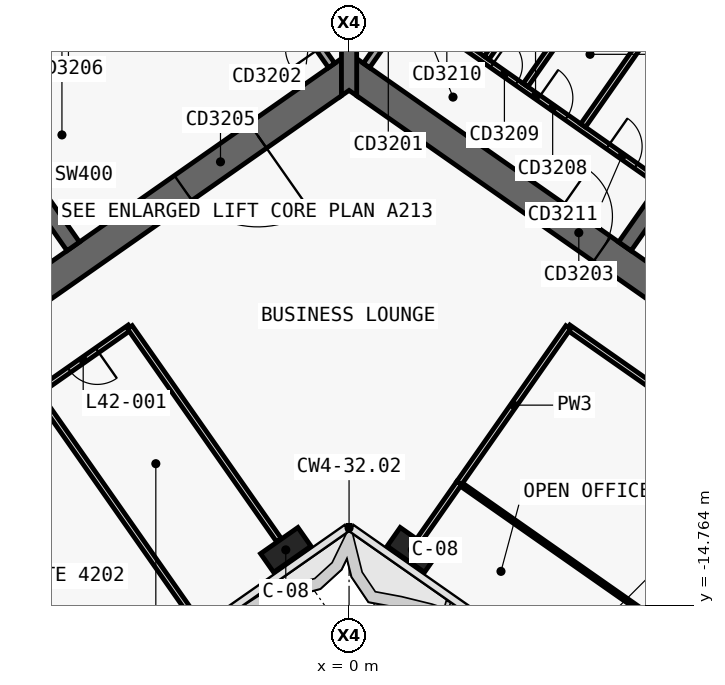
"""IFC4 building model, lengths in metres.
Left out: names, types, materials, properties, quantities, classifications, styles, units other than length and angle.
Written with IfcOpenShell. Run it as: python <this file> out.ifc"""

import sys

from ifc_helpers import new_model, si_unit, direction, frame, frame_2d, origin, origin_2d, place, context, subcontext, project, spatial, polyline, rectangle, outline, extrude, element, fill, save


model = new_model("IFC4")
c1 = context("Model", 3, precision=1e-05, world=origin(), true_north=direction((0.0, 1.0)))
c2 = subcontext(c1, "Body", "Model", "MODEL_VIEW")
j1 = project(units=[si_unit("LENGTHUNIT", "METRE"), si_unit("PLANEANGLEUNIT", "RADIAN")], contexts=[c1])
p1 = place(None, origin())
s1 = spatial("IfcSite", under=j1, at=p1, CompositionType="ELEMENT")
p2 = place(p1, origin())
s2 = spatial("IfcBuilding", under=s1, at=p2, CompositionType="ELEMENT")
p3 = place(p2, frame((0.0, 0.0, 182.7)))
s3 = spatial("IfcBuildingStorey", under=s2, at=p3, CompositionType="ELEMENT", Elevation=182.7)
p4 = place(p3, frame((0.029, 11.984, 0.0), z_axis=(0.0, 0.0, 1.0), x_axis=(-0.819151382952, -0.573577380837, 0.0)))
e1 = element("IfcWall", 1, at=p4, inside=s3, PredefinedType="SHEAR", context=c2, shape_type="SweptSolid", body=[
    extrude(outline(polyline([(33.898, 0.4), (0.56, 0.4), (-0.0, -0.4), (33.898, -0.4), (33.898, 0.4)])), origin(), (0.0, 0.0, 1.0), 3.9),
])
p5 = place(p3, frame((0.029, -0.712, 0.0), z_axis=(0.0, 0.0, 1.0), x_axis=(-0.819151758019, -0.573576845187, 0.0)))
e2 = element("IfcWall", 2, at=p5, inside=s3, PredefinedType="SHEAR", context=c2, shape_type="SweptSolid", body=[
    extrude(outline(polyline([(26.616, 0.4), (0.56, 0.4), (-0.0, -0.4), (26.616, -0.4), (26.616, 0.4)])), origin(), (0.0, 0.0, 1.0), 3.9),
])
p6 = place(p5, frame((2.966, 0.0, 0.0)))
e3 = element("IfcOpeningElement", 3, at=p6, cuts=e2, PredefinedType="OPENING", context=c2, shape_type="SweptSolid", body=[
    extrude(rectangle(XDim=2.4, YDim=2.1, at=frame_2d((1.2, 1.05))), frame((0.0, 0.41, 0.0), z_axis=(0.0, -1.0, 0.0), x_axis=(1.0, 0.0, 0.0)), (0.0, 0.0, 1.0), 0.82),
])
p7 = place(p5, frame((11.916, 0.0, 0.0)))
e4 = element("IfcOpeningElement", 4, at=p7, cuts=e2, PredefinedType="OPENING", context=c2, shape_type="SweptSolid", body=[
    extrude(rectangle(XDim=2.4, YDim=2.1, at=frame_2d((1.2, 1.05))), frame((0.0, 0.41, 0.0), z_axis=(0.0, -1.0, 0.0), x_axis=(1.0, 0.0, 0.0)), (0.0, 0.0, 1.0), 0.82),
])
p8 = place(p3, frame((-7.258, -5.326, 0.0), z_axis=(0.0, 0.0, 1.0), x_axis=(-0.573540709186, 0.819177059558, 0.0)))
e5 = element("IfcWall", 5, at=p8, inside=s3, PredefinedType="SHEAR", context=c2, shape_type="SweptSolid", body=[
    extrude(outline(polyline([(4.6, 0.2), (-0.0, 0.2), (-0.0, -0.2), (4.6, -0.2), (4.6, 0.2)])), origin(), (0.0, 0.0, 1.0), 3.9),
])
p9 = place(p3, frame((-2.638, 3.768, 0.0), z_axis=(0.0, 0.0, 1.0), x_axis=(-0.81915267502, -0.573575535572, 0.0)))
e6 = element("IfcWall", 6, at=p9, inside=s3, PredefinedType="SHEAR", context=c2, shape_type="SweptSolid", body=[
    extrude(outline(polyline([(26.2, 0.2), (0.0, 0.2), (0.0, -0.2), (26.2, -0.2), (26.2, 0.2)])), origin(), (0.0, 0.0, 1.0), 3.9),
])
p10 = place(p9, frame((1.169, 0.0, 0.0)))
e7 = element("IfcOpeningElement", 7, at=p10, cuts=e6, PredefinedType="OPENING", context=c2, shape_type="SweptSolid", body=[
    extrude(rectangle(XDim=1.1, YDim=2.1, at=frame_2d((0.55, 1.05))), frame((0.0, 0.21, 0.0), z_axis=(0.0, -1.0, 0.0), x_axis=(1.0, 0.0, 0.0)), (0.0, 0.0, 1.0), 0.42),
])
p11 = place(p9, frame((3.206, 0.0, 0.0)))
e8 = element("IfcOpeningElement", 8, at=p11, cuts=e6, PredefinedType="OPENING", context=c2, shape_type="SweptSolid", body=[
    extrude(rectangle(XDim=1.1, YDim=2.1, at=frame_2d((0.55, 1.05))), frame((0.0, 0.21, 0.0), z_axis=(0.0, -1.0, 0.0), x_axis=(1.0, 0.0, 0.0)), (0.0, 0.0, 1.0), 0.42),
])
p12 = place(p9, frame((5.244, 0.0, 0.0)))
e9 = element("IfcOpeningElement", 9, at=p12, cuts=e6, PredefinedType="OPENING", context=c2, shape_type="SweptSolid", body=[
    extrude(rectangle(XDim=1.1, YDim=2.1, at=frame_2d((0.55, 1.05))), frame((0.0, 0.21, 0.0), z_axis=(0.0, -1.0, 0.0), x_axis=(1.0, 0.0, 0.0)), (0.0, 0.0, 1.0), 0.42),
])
p13 = place(p9, frame((7.281, 0.0, 0.0)))
e10 = element("IfcOpeningElement", 10, at=p13, cuts=e6, PredefinedType="OPENING", context=c2, shape_type="SweptSolid", body=[
    extrude(rectangle(XDim=1.1, YDim=2.1, at=frame_2d((0.55, 1.05))), frame((0.0, 0.21, 0.0), z_axis=(0.0, -1.0, 0.0), x_axis=(1.0, 0.0, 0.0)), (0.0, 0.0, 1.0), 0.42),
])
p14 = place(p9, frame((9.688, 0.0, 0.0)))
e11 = element("IfcOpeningElement", 11, at=p14, cuts=e6, PredefinedType="OPENING", context=c2, shape_type="SweptSolid", body=[
    extrude(rectangle(XDim=1.1, YDim=2.1, at=frame_2d((0.55, 1.05))), frame((0.0, 0.21, 0.0), z_axis=(0.0, -1.0, 0.0), x_axis=(1.0, 0.0, 0.0)), (0.0, 0.0, 1.0), 0.42),
])
p15 = place(p9, frame((11.863, 0.0, 0.0)))
e12 = element("IfcOpeningElement", 12, at=p15, cuts=e6, PredefinedType="OPENING", context=c2, shape_type="SweptSolid", body=[
    extrude(rectangle(XDim=1.1, YDim=2.1, at=frame_2d((0.55, 1.05))), frame((0.0, 0.21, 0.0), z_axis=(0.0, -1.0, 0.0), x_axis=(1.0, 0.0, 0.0)), (0.0, 0.0, 1.0), 0.42),
])
p16 = place(p3, frame((-0.029, 11.984, 0.0), z_axis=(0.0, 0.0, 1.0), x_axis=(0.819151382952, -0.573577380837, 0.0)))
e13 = element("IfcWall", 13, at=p16, inside=s3, PredefinedType="SHEAR", context=c2, shape_type="SweptSolid", body=[
    extrude(outline(polyline([(33.898, 0.4), (-0.0, 0.4), (0.56, -0.4), (33.898, -0.4), (33.898, 0.4)])), origin(), (0.0, 0.0, 1.0), 3.9),
])
p17 = place(p3, frame((-0.029, -0.712, 0.0), z_axis=(0.0, 0.0, 1.0), x_axis=(0.819151758019, -0.573576845187, 0.0)))
e14 = element("IfcWall", 14, at=p17, inside=s3, PredefinedType="SHEAR", context=c2, shape_type="SweptSolid", body=[
    extrude(outline(polyline([(26.616, 0.4), (-0.0, 0.4), (0.56, -0.4), (26.616, -0.4), (26.616, 0.4)])), origin(), (0.0, 0.0, 1.0), 3.9),
])
p18 = place(p17, frame((6.666, 0.0, 0.0)))
e15 = element("IfcOpeningElement", 15, at=p18, cuts=e14, PredefinedType="OPENING", context=c2, shape_type="SweptSolid", body=[
    extrude(rectangle(XDim=1.5, YDim=2.1, at=frame_2d((0.75, 1.05))), frame((0.0, 0.41, 0.0), z_axis=(0.0, -1.0, 0.0), x_axis=(1.0, 0.0, 0.0)), (0.0, 0.0, 1.0), 0.82),
])
p19 = place(p17, frame((12.366, 0.0, 0.0)))
e16 = element("IfcOpeningElement", 16, at=p19, cuts=e14, PredefinedType="OPENING", context=c2, shape_type="SweptSolid", body=[
    extrude(rectangle(XDim=1.5, YDim=2.1, at=frame_2d((0.75, 1.05))), frame((0.0, 0.41, 0.0), z_axis=(0.0, -1.0, 0.0), x_axis=(1.0, 0.0, 0.0)), (0.0, 0.0, 1.0), 0.82),
])
p20 = place(p3, frame((7.258, -5.326, 0.0), z_axis=(0.0, 0.0, 1.0), x_axis=(0.573540709186, 0.819177059558, 0.0)))
e17 = element("IfcWall", 17, at=p20, inside=s3, PredefinedType="SHEAR", context=c2, shape_type="SweptSolid", body=[
    extrude(outline(polyline([(-0.0, 0.2), (-0.0, -0.2), (4.6, -0.2), (4.6, 0.2), (-0.0, 0.2)])), origin(), (0.0, 0.0, 1.0), 3.9),
])
p21 = place(p3, frame((2.638, 3.768, 0.0), z_axis=(0.0, 0.0, 1.0), x_axis=(0.81915267502, -0.573575535572, 0.0)))
e18 = element("IfcWall", 18, at=p21, inside=s3, PredefinedType="SHEAR", context=c2, shape_type="SweptSolid", body=[
    extrude(outline(polyline([(0.0, 0.2), (0.0, -0.2), (26.2, -0.2), (26.2, 0.2), (0.0, 0.2)])), origin(), (0.0, 0.0, 1.0), 3.9),
])
p22 = place(p21, frame((9.637, 0.0, 0.0)))
e19 = element("IfcOpeningElement", 19, at=p22, cuts=e18, PredefinedType="OPENING", context=c2, shape_type="SweptSolid", body=[
    extrude(rectangle(XDim=1.2, YDim=2.1, at=frame_2d((0.6, 1.05))), frame((0.0, 0.21, 0.0), z_axis=(0.0, -1.0, 0.0), x_axis=(1.0, 0.0, 0.0)), (0.0, 0.0, 1.0), 0.42),
])
p23 = place(p21, frame((11.812, 0.0, 0.0)))
e20 = element("IfcOpeningElement", 20, at=p23, cuts=e18, PredefinedType="OPENING", context=c2, shape_type="SweptSolid", body=[
    extrude(rectangle(XDim=1.2, YDim=2.1, at=frame_2d((0.6, 1.05))), frame((0.0, 0.21, 0.0), z_axis=(0.0, -1.0, 0.0), x_axis=(1.0, 0.0, 0.0)), (0.0, 0.0, 1.0), 0.42),
])
p24 = place(p21, frame((13.988, 0.0, 0.0)))
e21 = element("IfcOpeningElement", 21, at=p24, cuts=e18, PredefinedType="OPENING", context=c2, shape_type="SweptSolid", body=[
    extrude(rectangle(XDim=1.2, YDim=2.1, at=frame_2d((0.6, 1.05))), frame((0.0, 0.21, 0.0), z_axis=(0.0, -1.0, 0.0), x_axis=(1.0, 0.0, 0.0)), (0.0, 0.0, 1.0), 0.42),
])
p25 = place(p21, frame((16.262, 0.0, 0.0)))
e22 = element("IfcOpeningElement", 22, at=p25, cuts=e18, PredefinedType="OPENING", context=c2, shape_type="SweptSolid", body=[
    extrude(rectangle(XDim=1.0, YDim=2.1, at=frame_2d((0.5, 1.05))), frame((0.0, 0.21, 0.0), z_axis=(0.0, -1.0, 0.0), x_axis=(1.0, 0.0, 0.0)), (0.0, 0.0, 1.0), 0.42),
])
p26 = place(p3, frame((0.0, -1.361, 0.0), z_axis=(0.0, 0.0, 1.0), x_axis=(0.0, 1.0, 0.0)))
e23 = element("IfcWall", 23, at=p26, inside=s3, PredefinedType="SHEAR", context=c2, shape_type="SweptSolid", body=[
    extrude(outline(polyline([(0.0, -0.2), (0.14, -0.2), (1.075, -0.2), (12.696, -0.2), (13.813, -0.2), (13.893, -0.2), (13.933, -0.172), (13.813, 0.0), (13.933, 0.172), (13.893, 0.2), (13.813, 0.2), (12.696, 0.2), (1.075, 0.2), (0.14, 0.2), (0.0, 0.2), (0.14, 0.0), (0.0, -0.2)])), origin(), (0.0, 0.0, 1.0), 3.9),
])
for number, where, z_axis, x_axis in (
    (24, (-1.665, -13.313, 0.0), (0.0, 0.0, 1.0), (-0.819, -0.574, 0.0)),
    (25, (1.665, -13.313, 0.0), (0.0, 0.0, 1.0), (0.819, -0.574, 0.0)),
):
    element("IfcColumn", number, at=place(p3, frame(where, z_axis=z_axis, x_axis=x_axis)), inside=s3, PredefinedType="COLUMN", context=c2, shape_type="SweptSolid", body=[
        extrude(rectangle(XDim=1.2, YDim=0.6, at=origin_2d()), origin(), (0.0, 0.0, 1.0), 3.9),
    ])
p27 = place(p3, frame((1.63, 0.934, 0.0), z_axis=(0.0, 0.0, 1.0), x_axis=(0.819165963305, -0.573556557423, 0.0)))
e26 = element("IfcWall", 26, at=p27, inside=s3, PredefinedType="PARTITIONING", context=c2, shape_type="SweptSolid", body=[
    extrude(rectangle(XDim=8.0, YDim=0.15, at=frame_2d((4.0, 0.0))), origin(), (0.0, 0.0, 1.0), 3.62),
])
p28 = place(p27, frame((0.7, 0.0, 0.0)))
e27 = element("IfcOpeningElement", 27, at=p28, cuts=e26, PredefinedType="OPENING", context=c2, shape_type="SweptSolid", body=[
    extrude(rectangle(XDim=0.9, YDim=2.1, at=frame_2d((0.45, 1.05))), frame((0.0, 0.085, 0.0), z_axis=(0.0, -1.0, 0.0), x_axis=(1.0, 0.0, 0.0)), (0.0, 0.0, 1.0), 0.17),
])
p29 = place(p27, frame((2.6, 0.0, 0.0)))
e28 = element("IfcOpeningElement", 28, at=p29, cuts=e26, PredefinedType="OPENING", context=c2, shape_type="SweptSolid", body=[
    extrude(rectangle(XDim=0.8, YDim=2.1, at=frame_2d((0.4, 1.05))), frame((0.0, 0.085, 0.0), z_axis=(0.0, -1.0, 0.0), x_axis=(1.0, 0.0, 0.0)), (0.0, 0.0, 1.0), 0.17),
])
p30 = place(p27, frame((4.1, 0.0, 0.0)))
e29 = element("IfcOpeningElement", 29, at=p30, cuts=e26, PredefinedType="OPENING", context=c2, shape_type="SweptSolid", body=[
    extrude(rectangle(XDim=0.9, YDim=2.1, at=frame_2d((0.45, 1.05))), frame((0.0, 0.085, 0.0), z_axis=(0.0, -1.0, 0.0), x_axis=(1.0, 0.0, 0.0)), (0.0, 0.0, 1.0), 0.17),
])
p31 = place(p27, frame((6.325, 0.0, 0.0)))
e30 = element("IfcOpeningElement", 30, at=p31, cuts=e26, PredefinedType="OPENING", context=c2, shape_type="SweptSolid", body=[
    extrude(rectangle(XDim=0.9, YDim=2.1, at=frame_2d((0.45, 1.05))), frame((0.0, 0.085, 0.0), z_axis=(0.0, -1.0, 0.0), x_axis=(1.0, 0.0, 0.0)), (0.0, 0.0, 1.0), 0.17),
])
for number, where, z_axis, x_axis in (
    (31, (3.619, -0.367, 0.0), (0.0, 0.0, 1.0), (0.574, 0.819, 0.0)),
    (32, (4.643, -1.084, 0.0), (0.0, 0.0, 1.0), (0.574, 0.819, 0.0)),
    (33, (6.158, -2.145, 0.0), (0.0, 0.0, 1.0), (0.574, 0.819, 0.0)),
):
    element("IfcWall", number, at=place(p3, frame(where, z_axis=z_axis, x_axis=x_axis)), inside=s3, PredefinedType="PARTITIONING", context=c2, shape_type="SweptSolid", body=[
        extrude(rectangle(XDim=2.625, YDim=0.15, at=frame_2d((1.312, 0.0))), origin(), (0.0, 0.0, 1.0), 3.62),
    ])
p32 = place(p3, frame((-0.459, -0.565, 0.0), z_axis=(0.0, 0.0, 1.0), x_axis=(-0.573576324356, 0.819152122709, 0.0)))
e34 = element("IfcWall", 34, at=p32, inside=s3, PredefinedType="SOLIDWALL", context=c2, shape_type="SweptSolid", body=[
    extrude(rectangle(XDim=4.6, YDim=0.2, at=frame_2d((2.3, 0.0))), origin(), (0.0, 0.0, 1.0), 3.62),
])
p33 = place(p32, frame((0.55, 0.0, 0.0)))
e35 = element("IfcOpeningElement", 35, at=p33, cuts=e34, PredefinedType="OPENING", context=c2, shape_type="SweptSolid", body=[
    extrude(rectangle(XDim=0.9, YDim=2.1, at=frame_2d((0.45, 1.05))), frame((0.0, 0.11, 0.0), z_axis=(0.0, -1.0, 0.0), x_axis=(1.0, 0.0, 0.0)), (0.0, 0.0, 1.0), 0.22),
])
p34 = place(p3, frame((0.459, -0.565, 0.0), z_axis=(0.0, 0.0, 1.0), x_axis=(0.573576324356, 0.819152122709, 0.0)))
e36 = element("IfcWall", 36, at=p34, inside=s3, PredefinedType="SOLIDWALL", context=c2, shape_type="SweptSolid", body=[
    extrude(rectangle(XDim=4.6, YDim=0.2, at=frame_2d((2.3, 0.0))), origin(), (0.0, 0.0, 1.0), 3.62),
])
p35 = place(p34, frame((0.55, 0.0, 0.0)))
e37 = element("IfcOpeningElement", 37, at=p35, cuts=e36, PredefinedType="OPENING", context=c2, shape_type="SweptSolid", body=[
    extrude(rectangle(XDim=0.9, YDim=2.1, at=frame_2d((0.45, 1.05))), frame((0.0, 0.11, 0.0), z_axis=(0.0, -1.0, 0.0), x_axis=(1.0, 0.0, 0.0)), (0.0, 0.0, 1.0), 0.22),
])
p36 = place(p3, frame((20.513, -17.781, 0.0), z_axis=(0.0, 0.0, 1.0), x_axis=(-0.819147172988, 0.573583393228, 0.0)))
e38 = element("IfcWall", 38, at=p36, inside=s3, PredefinedType="PARTITIONING", context=c2, shape_type="SweptSolid", body=[
    extrude(rectangle(XDim=18.002, YDim=0.15, at=frame_2d((9.001, 0.0))), origin(), (0.0, 0.0, 1.0), 3.0),
])
p37 = place(p36, frame((8.201, 0.0, 0.0)))
e39 = element("IfcOpeningElement", 39, at=p37, cuts=e38, PredefinedType="OPENING", context=c2, shape_type="SweptSolid", body=[
    extrude(rectangle(XDim=1.6, YDim=2.1, at=frame_2d((0.8, 1.05))), frame((0.0, 0.085, 0.0), z_axis=(0.0, -1.0, 0.0), x_axis=(1.0, 0.0, 0.0)), (0.0, 0.0, 1.0), 0.17),
])
p38 = place(p3, frame((-5.766, -7.456, 0.0), z_axis=(0.0, 0.0, 1.0), x_axis=(-0.819132568355, -0.573604249862, 0.0)))
e40 = element("IfcWall", 40, at=p38, inside=s3, PredefinedType="PARTITIONING", context=c2, shape_type="SweptSolid", body=[
    extrude(rectangle(XDim=3.002, YDim=0.15, at=frame_2d((1.501, 0.0))), origin(), (0.0, 0.0, 1.0), 3.0),
])
p39 = place(p38, frame((1.051, 0.0, 0.0)))
e41 = element("IfcOpeningElement", 41, at=p39, cuts=e40, PredefinedType="OPENING", context=c2, shape_type="SweptSolid", body=[
    extrude(rectangle(XDim=0.9, YDim=2.1, at=frame_2d((0.45, 1.05))), frame((0.0, 0.085, 0.0), z_axis=(0.0, -1.0, 0.0), x_axis=(1.0, 0.0, 0.0)), (0.0, 0.0, 1.0), 0.17),
])
p40 = place(p3, frame((17.643, -21.877, 0.0), z_axis=(0.0, 0.0, 1.0), x_axis=(-0.819154173185, 0.573573395961, 0.0)))
e42 = element("IfcWall", 42, at=p40, inside=s3, PredefinedType="PARTITIONING", context=c2, shape_type="SweptSolid", body=[
    extrude(rectangle(XDim=18.0, YDim=0.1, at=frame_2d((9.0, 0.0))), origin(), (0.0, 0.0, 1.0), 3.0),
])
p41 = place(p40, frame((8.55, 0.0, 0.0)))
e43 = element("IfcOpeningElement", 43, at=p41, cuts=e42, PredefinedType="OPENING", context=c2, shape_type="SweptSolid", body=[
    extrude(rectangle(XDim=0.9, YDim=2.1, at=frame_2d((0.45, 1.05))), frame((0.0, 0.06, 0.0), z_axis=(0.0, -1.0, 0.0), x_axis=(1.0, 0.0, 0.0)), (0.0, 0.0, 1.0), 0.12),
])
p42 = place(p3, frame((1.849, -13.051, 0.0), z_axis=(0.0, 0.0, 1.0), x_axis=(0.573623601139, 0.819119017125, 0.0)))
e44 = element("IfcWall", 44, at=p42, inside=s3, PredefinedType="PARTITIONING", context=c2, shape_type="SweptSolid", body=[
    extrude(rectangle(XDim=1.829, YDim=0.15, at=frame_2d((0.915, 0.0))), origin(), (0.0, 0.0, 1.0), 3.0),
])
p43 = place(p3, frame((2.898, -11.552, 0.0), z_axis=(0.0, 0.0, 1.0), x_axis=(0.573586866468, 0.819144740944, 0.0)))
e45 = element("IfcWall", 45, at=p43, inside=s3, PredefinedType="PARTITIONING", context=c2, shape_type="SweptSolid", body=[
    extrude(rectangle(XDim=5.0, YDim=0.15, at=frame_2d((2.5, 0.0))), origin(), (0.0, 0.0, 1.0), 3.0),
])
p44 = place(p3, frame((-1.849, -13.051, 0.0), z_axis=(0.0, 0.0, 1.0), x_axis=(-0.57357985571, 0.819149650018, 0.0)))
e46 = element("IfcWall", 46, at=p44, inside=s3, PredefinedType="PARTITIONING", context=c2, shape_type="SweptSolid", body=[
    extrude(rectangle(XDim=6.832, YDim=0.15, at=frame_2d((3.416, 0.0))), origin(), (0.0, 0.0, 1.0), 3.0),
])
p45 = place(p3, frame((-3.922, -15.32, 0.0), z_axis=(0.0, 0.0, 1.0), x_axis=(-0.573560650686, 0.819163097304, 0.0)))
e47 = element("IfcWall", 47, at=p45, inside=s3, PredefinedType="PARTITIONING", context=c2, shape_type="SweptSolid", body=[
    extrude(rectangle(XDim=7.5, YDim=0.15, at=frame_2d((3.75, 0.0))), origin(), (0.0, 0.0, 1.0), 2.9),
])
p46 = place(p6, origin())
e48 = element("IfcDoor", 48, at=p46, inside=s3, OperationType="DOUBLE_DOOR_SINGLE_SWING", PredefinedType="DOOR", context=c2, shape_type="SweptSolid", body=[
    extrude(rectangle(XDim=2.4, YDim=2.1, at=frame_2d((1.2, 1.05))), frame((0.0, 0.025, 0.0), z_axis=(0.0, -1.0, 0.0), x_axis=(1.0, 0.0, 0.0)), (0.0, 0.0, 1.0), 0.05),
])
fill(e3, e48)
p47 = place(p29, origin())
e49 = element("IfcDoor", 49, at=p47, inside=s3, OperationType="SINGLE_SWING_RIGHT", PredefinedType="DOOR", context=c2, shape_type="SweptSolid", body=[
    extrude(rectangle(XDim=0.8, YDim=2.1, at=frame_2d((0.4, 1.05))), frame((0.0, 0.025, 0.0), z_axis=(0.0, -1.0, 0.0), x_axis=(1.0, 0.0, 0.0)), (0.0, 0.0, 1.0), 0.05),
])
fill(e28, e49)
p48 = place(p30, origin())
e50 = element("IfcDoor", 50, at=p48, inside=s3, OperationType="SINGLE_SWING_RIGHT", PredefinedType="DOOR", context=c2, shape_type="SweptSolid", body=[
    extrude(rectangle(XDim=0.9, YDim=2.1, at=frame_2d((0.45, 1.05))), frame((0.0, 0.025, 0.0), z_axis=(0.0, -1.0, 0.0), x_axis=(1.0, 0.0, 0.0)), (0.0, 0.0, 1.0), 0.05),
])
fill(e29, e50)
p49 = place(p31, origin())
e51 = element("IfcDoor", 51, at=p49, inside=s3, OperationType="SINGLE_SWING_RIGHT", PredefinedType="DOOR", context=c2, shape_type="SweptSolid", body=[
    extrude(rectangle(XDim=0.9, YDim=2.1, at=frame_2d((0.45, 1.05))), frame((0.0, 0.025, 0.0), z_axis=(0.0, -1.0, 0.0), x_axis=(1.0, 0.0, 0.0)), (0.0, 0.0, 1.0), 0.05),
])
fill(e30, e51)
p50 = place(p18, origin())
e52 = element("IfcDoor", 52, at=p50, inside=s3, OperationType="SINGLE_SWING_RIGHT", PredefinedType="DOOR", context=c2, shape_type="SweptSolid", body=[
    extrude(rectangle(XDim=1.5, YDim=2.1, at=frame_2d((0.75, 1.05))), frame((0.0, 0.025, 0.0), z_axis=(0.0, -1.0, 0.0), x_axis=(1.0, 0.0, 0.0)), (0.0, 0.0, 1.0), 0.05),
])
fill(e15, e52)
p51 = place(p39, origin())
e53 = element("IfcDoor", 53, at=p51, inside=s3, OperationType="SINGLE_SWING_RIGHT", PredefinedType="DOOR", context=c2, shape_type="SweptSolid", body=[
    extrude(rectangle(XDim=0.9, YDim=2.1, at=frame_2d((0.45, 1.05))), frame((0.0, 0.025, 0.0), z_axis=(0.0, -1.0, 0.0), x_axis=(1.0, 0.0, 0.0)), (0.0, 0.0, 1.0), 0.05),
])
fill(e41, e53)
save(model, sys.argv[1])
